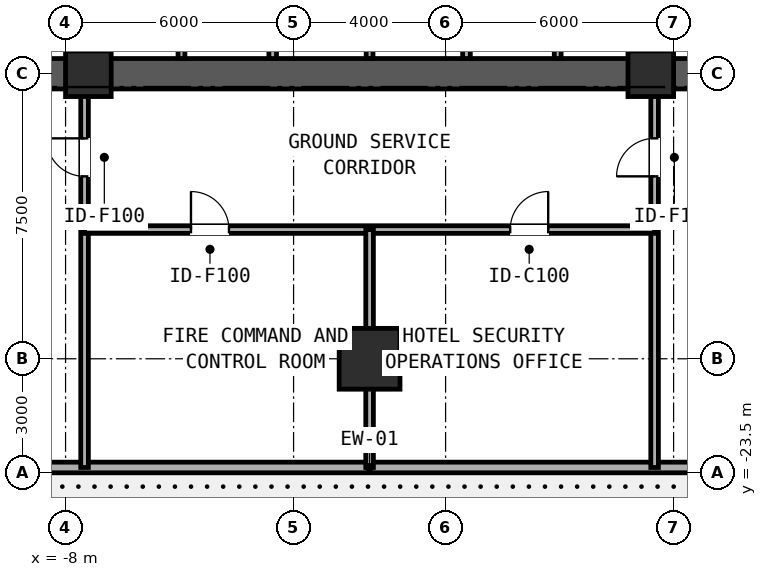
"""IFC4 building model, lengths in metres.
Left out: names, types, materials, properties, quantities, classifications, styles, units other than length and angle.
Written with IfcOpenShell. Run it as: python <this file> out.ifc"""

import sys

from ifc_helpers import new_model, si_unit, direction, frame, frame_2d, origin, origin_2d, place, context, subcontext, project, spatial, rectangle, extrude, element, fill, save


model = new_model("IFC4")
c1 = context("Model", 3, precision=1e-05, world=origin(), true_north=direction((0.0, 1.0)))
c2 = subcontext(c1, "Body", "Model", "MODEL_VIEW")
j1 = project(units=[si_unit("LENGTHUNIT", "METRE"), si_unit("PLANEANGLEUNIT", "RADIAN")], contexts=[c1])
p1 = place(None, origin())
s1 = spatial("IfcSite", under=j1, at=p1, CompositionType="ELEMENT")
p2 = place(p1, origin())
s2 = spatial("IfcBuilding", under=s1, at=p2, CompositionType="ELEMENT")
p3 = place(p2, origin())
s3 = spatial("IfcBuildingStorey", under=s2, at=p3, CompositionType="ELEMENT", Elevation=0.0)
p4 = place(p3, frame((-16.4, -13.0, 0.0), z_axis=(0.0, 0.0, 1.0), x_axis=(1.0, 0.0, 0.0)))
e1 = element("IfcWall", 1, at=p4, inside=s3, PredefinedType="SHEAR", context=c2, shape_type="SweptSolid", body=[
    extrude(rectangle(XDim=32.8, YDim=0.8, at=frame_2d((16.4, 0.0))), origin(), (0.0, 0.0, 1.0), 4.82),
])
for number, where, z_axis, x_axis in (
    (2, (-7.4, -12.6, 0.0), (0.0, 0.0, 1.0), (0.0, 1.0, 0.0)),
    (3, (7.4, -12.6, 0.0), (0.0, 0.0, 1.0), (0.0, 1.0, 0.0)),
):
    element("IfcWall", number, at=place(p3, frame(where, z_axis=z_axis, x_axis=x_axis)), inside=s3, PredefinedType="SHEAR", context=c2, shape_type="SweptSolid", body=[
        extrude(rectangle(XDim=9.7, YDim=0.4, at=frame_2d((4.85, 0.0))), origin(), (0.0, 0.0, 1.0), 5.1),
    ])
for number, where, z_axis, x_axis in (
    (4, (-7.4, -13.0, 0.0), (0.0, 0.0, 1.0), (1.0, 0.0, 0.0)),
    (5, (7.4, -13.0, 0.0), (0.0, 0.0, 1.0), (1.0, 0.0, 0.0)),
):
    element("IfcColumn", number, at=place(p3, frame(where, z_axis=z_axis, x_axis=x_axis)), inside=s3, PredefinedType="COLUMN", context=c2, shape_type="SweptSolid", body=[
        extrude(rectangle(XDim=1.2, YDim=1.2, at=origin_2d()), origin(), (0.0, 0.0, 1.0), 5.4),
    ])
p5 = place(p3, frame((0.0, -20.5, 0.0), z_axis=(0.0, 0.0, 1.0), x_axis=(1.0, 0.0, 0.0)))
e6 = element("IfcColumn", 6, at=p5, inside=s3, PredefinedType="COLUMN", context=c2, shape_type="SweptSolid", body=[
    extrude(rectangle(XDim=1.6, YDim=1.6, at=origin_2d()), origin(), (0.0, 0.0, 1.0), 5.4),
])
p6 = place(p3, frame((-32.4, -23.36, 0.0), z_axis=(0.0, 0.0, 1.0), x_axis=(1.0, 0.0, 0.0)))
e7 = element("IfcWall", 7, at=p6, inside=s3, PredefinedType="STANDARD", context=c2, shape_type="SweptSolid", body=[
    extrude(rectangle(XDim=64.8, YDim=0.28, at=frame_2d((32.4, 0.0))), origin(), (0.0, 0.0, 1.0), 5.1),
])
p7 = place(p6, frame((16.9, 0.0, 0.0)))
e8 = element("IfcOpeningElement", 8, at=p7, cuts=e7, PredefinedType="OPENING", context=c2, shape_type="SweptSolid", body=[
    extrude(rectangle(XDim=2.0, YDim=2.35, at=frame_2d((1.0, 1.175))), frame((0.0, 0.15, 0.0), z_axis=(0.0, -1.0, 0.0), x_axis=(1.0, 0.0, 0.0)), (0.0, 0.0, 1.0), 0.3),
])
p8 = place(p6, frame((45.9, 0.0, 0.0)))
e9 = element("IfcOpeningElement", 9, at=p8, cuts=e7, PredefinedType="OPENING", context=c2, shape_type="SweptSolid", body=[
    extrude(rectangle(XDim=2.0, YDim=2.35, at=frame_2d((1.0, 1.175))), frame((0.0, 0.15, 0.0), z_axis=(0.0, -1.0, 0.0), x_axis=(1.0, 0.0, 0.0)), (0.0, 0.0, 1.0), 0.3),
])
p9 = place(p3, frame((-4.95, -12.6, 0.0), z_axis=(0.0, 0.0, 1.0), x_axis=(0.0, 1.0, 0.0)))
e10 = element("IfcWall", 10, at=p9, inside=s3, PredefinedType="PARTITIONING", context=c2, shape_type="SweptSolid", body=[
    extrude(rectangle(XDim=3.15, YDim=0.18, at=frame_2d((1.575, 0.0))), origin(), (0.0, 0.0, 1.0), 5.1),
])
p10 = place(p3, frame((-2.55, -12.6, 0.0), z_axis=(0.0, 0.0, 1.0), x_axis=(0.0, 1.0, 0.0)))
e11 = element("IfcWall", 11, at=p10, inside=s3, PredefinedType="PARTITIONING", context=c2, shape_type="SweptSolid", body=[
    extrude(rectangle(XDim=3.15, YDim=0.2, at=frame_2d((1.575, 0.0))), origin(), (0.0, 0.0, 1.0), 5.1),
])
p11 = place(p3, frame((0.0, -12.6, 0.0), z_axis=(0.0, 0.0, 1.0), x_axis=(0.0, 1.0, 0.0)))
e12 = element("IfcWall", 12, at=p11, inside=s3, PredefinedType="PARTITIONING", context=c2, shape_type="SweptSolid", body=[
    extrude(rectangle(XDim=3.15, YDim=0.18, at=frame_2d((1.575, 0.0))), origin(), (0.0, 0.0, 1.0), 5.1),
])
p12 = place(p3, frame((2.55, -12.6, 0.0), z_axis=(0.0, 0.0, 1.0), x_axis=(0.0, 1.0, 0.0)))
e13 = element("IfcWall", 13, at=p12, inside=s3, PredefinedType="PARTITIONING", context=c2, shape_type="SweptSolid", body=[
    extrude(rectangle(XDim=3.15, YDim=0.2, at=frame_2d((1.575, 0.0))), origin(), (0.0, 0.0, 1.0), 5.1),
])
p13 = place(p3, frame((4.95, -12.6, 0.0), z_axis=(0.0, 0.0, 1.0), x_axis=(0.0, 1.0, 0.0)))
e14 = element("IfcWall", 14, at=p13, inside=s3, PredefinedType="PARTITIONING", context=c2, shape_type="SweptSolid", body=[
    extrude(rectangle(XDim=3.15, YDim=0.18, at=frame_2d((1.575, 0.0))), origin(), (0.0, 0.0, 1.0), 5.1),
])
p14 = place(p3, frame((-7.5, -23.36, 0.0), z_axis=(0.0, 0.0, 1.0), x_axis=(0.0, 1.0, 0.0)))
e15 = element("IfcWall", 15, at=p14, inside=s3, PredefinedType="PARTITIONING", context=c2, shape_type="SweptSolid", body=[
    extrude(rectangle(XDim=10.01, YDim=0.2, at=frame_2d((5.005, 0.0))), origin(), (0.0, 0.0, 1.0), 4.229),
])
p15 = place(p14, frame((7.66, 0.0, 0.0)))
e16 = element("IfcOpeningElement", 16, at=p15, cuts=e15, PredefinedType="OPENING", context=c2, shape_type="SweptSolid", body=[
    extrude(rectangle(XDim=1.0, YDim=2.1, at=frame_2d((0.5, 1.05))), frame((0.0, 0.11, 0.0), z_axis=(0.0, -1.0, 0.0), x_axis=(1.0, 0.0, 0.0)), (0.0, 0.0, 1.0), 0.22),
])
p16 = place(p3, frame((7.5, -23.36, 0.0), z_axis=(0.0, 0.0, 1.0), x_axis=(0.0, 1.0, 0.0)))
e17 = element("IfcWall", 17, at=p16, inside=s3, PredefinedType="PARTITIONING", context=c2, shape_type="SweptSolid", body=[
    extrude(rectangle(XDim=10.01, YDim=0.2, at=frame_2d((5.005, 0.0))), origin(), (0.0, 0.0, 1.0), 4.229),
])
p17 = place(p16, frame((7.66, 0.0, 0.0)))
e18 = element("IfcOpeningElement", 18, at=p17, cuts=e17, PredefinedType="OPENING", context=c2, shape_type="SweptSolid", body=[
    extrude(rectangle(XDim=1.0, YDim=2.1, at=frame_2d((0.5, 1.05))), frame((0.0, 0.11, 0.0), z_axis=(0.0, -1.0, 0.0), x_axis=(1.0, 0.0, 0.0)), (0.0, 0.0, 1.0), 0.22),
])
p18 = place(p3, frame((-7.5, -17.1, 0.0), z_axis=(0.0, 0.0, 1.0), x_axis=(1.0, 0.0, 0.0)))
e19 = element("IfcWall", 19, at=p18, inside=s3, PredefinedType="PARTITIONING", context=c2, shape_type="SweptSolid", body=[
    extrude(rectangle(XDim=15.0, YDim=0.2, at=frame_2d((7.5, 0.0))), origin(), (0.0, 0.0, 1.0), 4.229),
])
p19 = place(p18, frame((2.8, 0.0, 0.0)))
e20 = element("IfcOpeningElement", 20, at=p19, cuts=e19, PredefinedType="OPENING", context=c2, shape_type="SweptSolid", body=[
    extrude(rectangle(XDim=1.0, YDim=2.1, at=frame_2d((0.5, 1.05))), frame((0.0, 0.11, 0.0), z_axis=(0.0, -1.0, 0.0), x_axis=(1.0, 0.0, 0.0)), (0.0, 0.0, 1.0), 0.22),
])
p20 = place(p18, frame((11.2, 0.0, 0.0)))
e21 = element("IfcOpeningElement", 21, at=p20, cuts=e19, PredefinedType="OPENING", context=c2, shape_type="SweptSolid", body=[
    extrude(rectangle(XDim=1.0, YDim=2.15, at=frame_2d((0.5, 1.075))), frame((0.0, 0.11, 0.0), z_axis=(0.0, -1.0, 0.0), x_axis=(1.0, 0.0, 0.0)), (0.0, 0.0, 1.0), 0.22),
])
p21 = place(p3, frame((0.0, -23.36, 0.0), z_axis=(0.0, 0.0, 1.0), x_axis=(0.0, 1.0, 0.0)))
e22 = element("IfcWall", 22, at=p21, inside=s3, PredefinedType="PARTITIONING", context=c2, shape_type="SweptSolid", body=[
    extrude(rectangle(XDim=6.26, YDim=0.2, at=frame_2d((3.13, 0.0))), origin(), (0.0, 0.0, 1.0), 4.229),
])
p22 = place(p19, origin())
e23 = element("IfcDoor", 23, at=p22, inside=s3, OperationType="SINGLE_SWING_LEFT", PredefinedType="DOOR", context=c2, shape_type="SweptSolid", body=[
    extrude(rectangle(XDim=1.0, YDim=2.1, at=frame_2d((0.5, 1.05))), frame((0.0, 0.025, 0.0), z_axis=(0.0, -1.0, 0.0), x_axis=(1.0, 0.0, 0.0)), (0.0, 0.0, 1.0), 0.05),
])
fill(e20, e23)
p23 = place(p20, origin())
e24 = element("IfcDoor", 24, at=p23, inside=s3, OperationType="SINGLE_SWING_RIGHT", PredefinedType="DOOR", context=c2, shape_type="SweptSolid", body=[
    extrude(rectangle(XDim=1.0, YDim=2.15, at=frame_2d((0.5, 1.075))), frame((0.0, 0.025, 0.0), z_axis=(0.0, -1.0, 0.0), x_axis=(1.0, 0.0, 0.0)), (0.0, 0.0, 1.0), 0.05),
])
fill(e21, e24)
p24 = place(p15, origin())
e25 = element("IfcDoor", 25, at=p24, inside=s3, OperationType="SINGLE_SWING_RIGHT", PredefinedType="DOOR", context=c2, shape_type="SweptSolid", body=[
    extrude(rectangle(XDim=1.0, YDim=2.1, at=frame_2d((0.5, 1.05))), frame((0.0, 0.025, 0.0), z_axis=(0.0, -1.0, 0.0), x_axis=(1.0, 0.0, 0.0)), (0.0, 0.0, 1.0), 0.05),
])
fill(e16, e25)
p25 = place(p17, frame((1.0, 0.0, 0.0), z_axis=(0.0, 0.0, 1.0), x_axis=(-1.0, 0.0, 0.0)))
e26 = element("IfcDoor", 26, at=p25, inside=s3, OperationType="SINGLE_SWING_LEFT", PredefinedType="DOOR", context=c2, shape_type="SweptSolid", body=[
    extrude(rectangle(XDim=1.0, YDim=2.1, at=frame_2d((0.5, 1.05))), frame((0.0, 0.025, 0.0), z_axis=(0.0, -1.0, 0.0), x_axis=(1.0, 0.0, 0.0)), (0.0, 0.0, 1.0), 0.05),
])
fill(e18, e26)
save(model, sys.argv[1])
